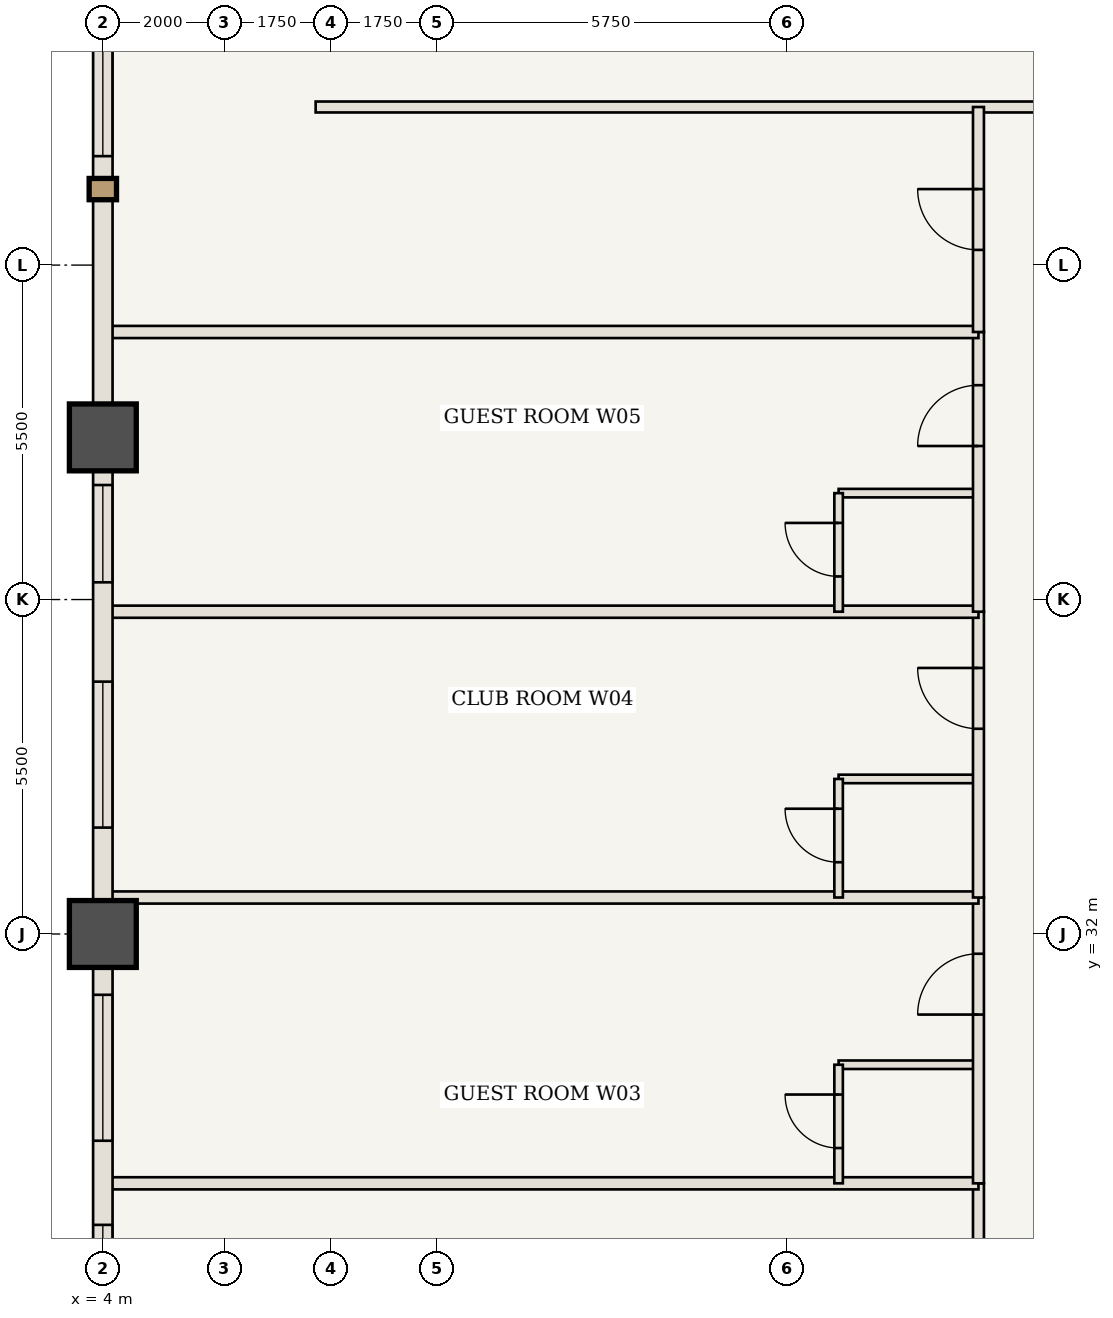
"""IFC4 building model, lengths in metres.
Left out: names, types, materials, properties, quantities, classifications, styles, units other than length and angle.
Written with IfcOpenShell. Run it as: python <this file> out.ifc"""

import sys

from ifc_helpers import new_model, si_unit, direction, frame, frame_2d, origin, origin_2d, place, context, subcontext, project, spatial, rectangle, extrude, element, fill, save


model = new_model("IFC4")
c1 = context("Model", 3, precision=1e-05, world=origin(), true_north=direction((0.0, 1.0)))
c2 = subcontext(c1, "Body", "Model", "MODEL_VIEW")
j1 = project(units=[si_unit("LENGTHUNIT", "METRE"), si_unit("PLANEANGLEUNIT", "RADIAN")], contexts=[c1])
p1 = place(None, origin())
s1 = spatial("IfcSite", under=j1, at=p1, CompositionType="ELEMENT")
p2 = place(p1, origin())
s2 = spatial("IfcBuilding", under=s1, at=p2, CompositionType="ELEMENT")
p3 = place(p2, frame((0.0, 0.0, 42.35)))
s3 = spatial("IfcBuildingStorey", under=s2, at=p3, CompositionType="ELEMENT", Elevation=42.35)
for number, where, z_axis, x_axis in (
    (1, (4.0, 32.0, 0.0), (0.0, 0.0, 1.0), (1.0, 0.0, 0.0)),
    (2, (4.0, 40.167, 0.0), (0.0, 0.0, 1.0), (1.0, 0.0, 0.0)),
):
    element("IfcColumn", number, at=place(p3, frame(where, z_axis=z_axis, x_axis=x_axis)), inside=s3, PredefinedType="COLUMN", context=c2, shape_type="SweptSolid", body=[
        extrude(rectangle(XDim=1.1, YDim=1.1, at=origin_2d()), origin(), (0.0, 0.0, 1.0), 3.5),
    ])
p4 = place(p3, frame((7.5, 45.6, 0.0), z_axis=(0.0, 0.0, 1.0), x_axis=(1.0, 0.0, 0.0)))
e3 = element("IfcWall", 3, at=p4, inside=s3, PredefinedType="STANDARD", context=c2, shape_type="SweptSolid", body=[
    extrude(rectangle(XDim=16.6, YDim=0.18, at=frame_2d((8.3, 0.0))), origin(), (0.0, 0.0, 1.0), 3.32),
])
p5 = place(p4, frame((11.825, 0.0, 0.0)))
e4 = element("IfcOpeningElement", 4, at=p5, cuts=e3, PredefinedType="OPENING", context=c2, shape_type="SweptSolid", body=[
    extrude(rectangle(XDim=1.0, YDim=2.15, at=frame_2d((0.5, 1.075))), frame((0.0, 0.1, 0.0), z_axis=(0.0, -1.0, 0.0), x_axis=(1.0, 0.0, 0.0)), (0.0, 0.0, 1.0), 0.2),
])
p6 = place(p3, frame((18.4, 23.2, 0.0), z_axis=(0.0, 0.0, 1.0), x_axis=(0.0, 1.0, 0.0)))
e5 = element("IfcWall", 5, at=p6, inside=s3, PredefinedType="STANDARD", context=c2, shape_type="SweptSolid", body=[
    extrude(rectangle(XDim=4.7, YDim=0.18, at=frame_2d((2.35, 0.0))), origin(), (0.0, 0.0, 1.0), 3.32),
])
p7 = place(p6, frame((2.775, 0.0, 0.0)))
e6 = element("IfcOpeningElement", 6, at=p7, cuts=e5, PredefinedType="OPENING", context=c2, shape_type="SweptSolid", body=[
    extrude(rectangle(XDim=1.0, YDim=2.15, at=frame_2d((0.5, 1.075))), frame((0.0, 0.1, 0.0), z_axis=(0.0, -1.0, 0.0), x_axis=(1.0, 0.0, 0.0)), (0.0, 0.0, 1.0), 0.2),
])
p8 = place(p3, frame((4.06, 27.9, 0.0), z_axis=(0.0, 0.0, 1.0), x_axis=(1.0, 0.0, 0.0)))
e7 = element("IfcWall", 7, at=p8, inside=s3, PredefinedType="STANDARD", context=c2, shape_type="SweptSolid", body=[
    extrude(rectangle(XDim=14.34, YDim=0.2, at=frame_2d((7.17, 0.0))), origin(), (0.0, 0.0, 1.0), 3.32),
])
p9 = place(p3, frame((16.1, 29.85, 0.0), z_axis=(0.0, 0.0, 1.0), x_axis=(1.0, 0.0, 0.0)))
e8 = element("IfcWall", 8, at=p9, inside=s3, PredefinedType="STANDARD", context=c2, shape_type="SweptSolid", body=[
    extrude(rectangle(XDim=2.3, YDim=0.14, at=frame_2d((1.15, 0.0))), origin(), (0.0, 0.0, 1.0), 3.32),
])
p10 = place(p3, frame((16.1, 27.9, 0.0), z_axis=(0.0, 0.0, 1.0), x_axis=(0.0, 1.0, 0.0)))
e9 = element("IfcWall", 9, at=p10, inside=s3, PredefinedType="STANDARD", context=c2, shape_type="SweptSolid", body=[
    extrude(rectangle(XDim=1.95, YDim=0.14, at=frame_2d((0.975, 0.0))), origin(), (0.0, 0.0, 1.0), 3.32),
])
p11 = place(p10, frame((0.58, 0.0, 0.0)))
e10 = element("IfcOpeningElement", 10, at=p11, cuts=e9, PredefinedType="OPENING", context=c2, shape_type="SweptSolid", body=[
    extrude(rectangle(XDim=0.88, YDim=2.1, at=frame_2d((0.44, 1.05))), frame((0.0, 0.08, 0.0), z_axis=(0.0, -1.0, 0.0), x_axis=(1.0, 0.0, 0.0)), (0.0, 0.0, 1.0), 0.16),
])
p12 = place(p3, frame((18.4, 27.9, 0.0), z_axis=(0.0, 0.0, 1.0), x_axis=(0.0, 1.0, 0.0)))
e11 = element("IfcWall", 11, at=p12, inside=s3, PredefinedType="STANDARD", context=c2, shape_type="SweptSolid", body=[
    extrude(rectangle(XDim=4.7, YDim=0.18, at=frame_2d((2.35, 0.0))), origin(), (0.0, 0.0, 1.0), 3.32),
])
p13 = place(p12, frame((2.775, 0.0, 0.0)))
e12 = element("IfcOpeningElement", 12, at=p13, cuts=e11, PredefinedType="OPENING", context=c2, shape_type="SweptSolid", body=[
    extrude(rectangle(XDim=1.0, YDim=2.15, at=frame_2d((0.5, 1.075))), frame((0.0, 0.1, 0.0), z_axis=(0.0, -1.0, 0.0), x_axis=(1.0, 0.0, 0.0)), (0.0, 0.0, 1.0), 0.2),
])
p14 = place(p3, frame((4.06, 32.6, 0.0), z_axis=(0.0, 0.0, 1.0), x_axis=(1.0, 0.0, 0.0)))
e13 = element("IfcWall", 13, at=p14, inside=s3, PredefinedType="STANDARD", context=c2, shape_type="SweptSolid", body=[
    extrude(rectangle(XDim=14.34, YDim=0.2, at=frame_2d((7.17, 0.0))), origin(), (0.0, 0.0, 1.0), 3.32),
])
p15 = place(p3, frame((16.1, 34.55, 0.0), z_axis=(0.0, 0.0, 1.0), x_axis=(1.0, 0.0, 0.0)))
e14 = element("IfcWall", 14, at=p15, inside=s3, PredefinedType="STANDARD", context=c2, shape_type="SweptSolid", body=[
    extrude(rectangle(XDim=2.3, YDim=0.14, at=frame_2d((1.15, 0.0))), origin(), (0.0, 0.0, 1.0), 3.32),
])
p16 = place(p3, frame((16.1, 32.6, 0.0), z_axis=(0.0, 0.0, 1.0), x_axis=(0.0, 1.0, 0.0)))
e15 = element("IfcWall", 15, at=p16, inside=s3, PredefinedType="STANDARD", context=c2, shape_type="SweptSolid", body=[
    extrude(rectangle(XDim=1.95, YDim=0.14, at=frame_2d((0.975, 0.0))), origin(), (0.0, 0.0, 1.0), 3.32),
])
p17 = place(p16, frame((0.58, 0.0, 0.0)))
e16 = element("IfcOpeningElement", 16, at=p17, cuts=e15, PredefinedType="OPENING", context=c2, shape_type="SweptSolid", body=[
    extrude(rectangle(XDim=0.88, YDim=2.1, at=frame_2d((0.44, 1.05))), frame((0.0, 0.08, 0.0), z_axis=(0.0, -1.0, 0.0), x_axis=(1.0, 0.0, 0.0)), (0.0, 0.0, 1.0), 0.16),
])
p18 = place(p3, frame((18.4, 32.6, 0.0), z_axis=(0.0, 0.0, 1.0), x_axis=(0.0, 1.0, 0.0)))
e17 = element("IfcWall", 17, at=p18, inside=s3, PredefinedType="STANDARD", context=c2, shape_type="SweptSolid", body=[
    extrude(rectangle(XDim=4.7, YDim=0.18, at=frame_2d((2.35, 0.0))), origin(), (0.0, 0.0, 1.0), 3.32),
])
p19 = place(p18, frame((2.775, 0.0, 0.0)))
e18 = element("IfcOpeningElement", 18, at=p19, cuts=e17, PredefinedType="OPENING", context=c2, shape_type="SweptSolid", body=[
    extrude(rectangle(XDim=1.0, YDim=2.15, at=frame_2d((0.5, 1.075))), frame((0.0, 0.1, 0.0), z_axis=(0.0, -1.0, 0.0), x_axis=(1.0, 0.0, 0.0)), (0.0, 0.0, 1.0), 0.2),
])
p20 = place(p3, frame((4.06, 37.3, 0.0), z_axis=(0.0, 0.0, 1.0), x_axis=(1.0, 0.0, 0.0)))
e19 = element("IfcWall", 19, at=p20, inside=s3, PredefinedType="STANDARD", context=c2, shape_type="SweptSolid", body=[
    extrude(rectangle(XDim=14.34, YDim=0.2, at=frame_2d((7.17, 0.0))), origin(), (0.0, 0.0, 1.0), 3.32),
])
p21 = place(p3, frame((16.1, 39.25, 0.0), z_axis=(0.0, 0.0, 1.0), x_axis=(1.0, 0.0, 0.0)))
e20 = element("IfcWall", 20, at=p21, inside=s3, PredefinedType="STANDARD", context=c2, shape_type="SweptSolid", body=[
    extrude(rectangle(XDim=2.3, YDim=0.14, at=frame_2d((1.15, 0.0))), origin(), (0.0, 0.0, 1.0), 3.32),
])
p22 = place(p3, frame((16.1, 37.3, 0.0), z_axis=(0.0, 0.0, 1.0), x_axis=(0.0, 1.0, 0.0)))
e21 = element("IfcWall", 21, at=p22, inside=s3, PredefinedType="STANDARD", context=c2, shape_type="SweptSolid", body=[
    extrude(rectangle(XDim=1.95, YDim=0.14, at=frame_2d((0.975, 0.0))), origin(), (0.0, 0.0, 1.0), 3.32),
])
p23 = place(p22, frame((0.58, 0.0, 0.0)))
e22 = element("IfcOpeningElement", 22, at=p23, cuts=e21, PredefinedType="OPENING", context=c2, shape_type="SweptSolid", body=[
    extrude(rectangle(XDim=0.88, YDim=2.1, at=frame_2d((0.44, 1.05))), frame((0.0, 0.08, 0.0), z_axis=(0.0, -1.0, 0.0), x_axis=(1.0, 0.0, 0.0)), (0.0, 0.0, 1.0), 0.16),
])
p24 = place(p3, frame((18.4, 37.3, 0.0), z_axis=(0.0, 0.0, 1.0), x_axis=(0.0, 1.0, 0.0)))
e23 = element("IfcWall", 23, at=p24, inside=s3, PredefinedType="STANDARD", context=c2, shape_type="SweptSolid", body=[
    extrude(rectangle(XDim=4.6, YDim=0.18, at=frame_2d((2.3, 0.0))), origin(), (0.0, 0.0, 1.0), 3.32),
])
p25 = place(p24, frame((2.725, 0.0, 0.0)))
e24 = element("IfcOpeningElement", 24, at=p25, cuts=e23, PredefinedType="OPENING", context=c2, shape_type="SweptSolid", body=[
    extrude(rectangle(XDim=1.0, YDim=2.15, at=frame_2d((0.5, 1.075))), frame((0.0, 0.1, 0.0), z_axis=(0.0, -1.0, 0.0), x_axis=(1.0, 0.0, 0.0)), (0.0, 0.0, 1.0), 0.2),
])
p26 = place(p3, frame((4.06, 41.9, 0.0), z_axis=(0.0, 0.0, 1.0), x_axis=(1.0, 0.0, 0.0)))
e25 = element("IfcWall", 25, at=p26, inside=s3, PredefinedType="STANDARD", context=c2, shape_type="SweptSolid", body=[
    extrude(rectangle(XDim=14.34, YDim=0.2, at=frame_2d((7.17, 0.0))), origin(), (0.0, 0.0, 1.0), 3.32),
])
p27 = place(p3, frame((18.4, 41.9, 0.0), z_axis=(0.0, 0.0, 1.0), x_axis=(0.0, 1.0, 0.0)))
e26 = element("IfcWall", 26, at=p27, inside=s3, PredefinedType="STANDARD", context=c2, shape_type="SweptSolid", body=[
    extrude(rectangle(XDim=3.7, YDim=0.18, at=frame_2d((1.85, 0.0))), origin(), (0.0, 0.0, 1.0), 3.32),
])
p28 = place(p27, frame((1.35, 0.0, 0.0)))
e27 = element("IfcOpeningElement", 27, at=p28, cuts=e26, PredefinedType="OPENING", context=c2, shape_type="SweptSolid", body=[
    extrude(rectangle(XDim=1.0, YDim=2.15, at=frame_2d((0.5, 1.075))), frame((0.0, 0.1, 0.0), z_axis=(0.0, -1.0, 0.0), x_axis=(1.0, 0.0, 0.0)), (0.0, 0.0, 1.0), 0.2),
])
p29 = place(p3, frame((4.0, 23.833, 0.0), z_axis=(0.0, 0.0, 1.0), x_axis=(0.0, 1.0, 0.0)))
e28 = element("IfcWall", 28, at=p29, inside=s3, PredefinedType="USERDEFINED", context=c2, shape_type="SweptSolid", body=[
    extrude(rectangle(XDim=8.167, YDim=0.32, at=frame_2d((4.083, 0.0))), origin(), (0.0, 0.0, 1.0), 2.52),
])
p30 = place(p29, frame((0.983, 0.0, 0.85)))
e29 = element("IfcOpeningElement", 29, at=p30, cuts=e28, PredefinedType="OPENING", context=c2, shape_type="SweptSolid", body=[
    extrude(rectangle(XDim=2.4, YDim=1.47, at=frame_2d((1.2, 0.735))), frame((0.0, 0.17, 0.0), z_axis=(0.0, -1.0, 0.0), x_axis=(1.0, 0.0, 0.0)), (0.0, 0.0, 1.0), 0.34),
])
p31 = place(p29, frame((4.767, 0.0, 0.85)))
e30 = element("IfcOpeningElement", 30, at=p31, cuts=e28, PredefinedType="OPENING", context=c2, shape_type="SweptSolid", body=[
    extrude(rectangle(XDim=2.4, YDim=1.47, at=frame_2d((1.2, 0.735))), frame((0.0, 0.17, 0.0), z_axis=(0.0, -1.0, 0.0), x_axis=(1.0, 0.0, 0.0)), (0.0, 0.0, 1.0), 0.34),
])
p32 = place(p3, frame((4.0, 32.0, 0.0), z_axis=(0.0, 0.0, 1.0), x_axis=(0.0, 1.0, 0.0)))
e31 = element("IfcWall", 31, at=p32, inside=s3, PredefinedType="USERDEFINED", context=c2, shape_type="SweptSolid", body=[
    extrude(rectangle(XDim=8.167, YDim=0.32, at=frame_2d((4.083, 0.0))), origin(), (0.0, 0.0, 1.0), 2.52),
])
p33 = place(p32, frame((1.75, 0.0, 0.85)))
e32 = element("IfcOpeningElement", 32, at=p33, cuts=e31, PredefinedType="OPENING", context=c2, shape_type="SweptSolid", body=[
    extrude(rectangle(XDim=2.4, YDim=1.47, at=frame_2d((1.2, 0.735))), frame((0.0, 0.17, 0.0), z_axis=(0.0, -1.0, 0.0), x_axis=(1.0, 0.0, 0.0)), (0.0, 0.0, 1.0), 0.34),
])
p34 = place(p32, frame((5.783, 0.0, 0.85)))
e33 = element("IfcOpeningElement", 33, at=p34, cuts=e31, PredefinedType="OPENING", context=c2, shape_type="SweptSolid", body=[
    extrude(rectangle(XDim=1.6, YDim=1.47, at=frame_2d((0.8, 0.735))), frame((0.0, 0.17, 0.0), z_axis=(0.0, -1.0, 0.0), x_axis=(1.0, 0.0, 0.0)), (0.0, 0.0, 1.0), 0.34),
])
p35 = place(p3, frame((4.0, 40.167, 0.0), z_axis=(0.0, 0.0, 1.0), x_axis=(0.0, 1.0, 0.0)))
e34 = element("IfcWall", 34, at=p35, inside=s3, PredefinedType="USERDEFINED", context=c2, shape_type="SweptSolid", body=[
    extrude(rectangle(XDim=8.167, YDim=0.32, at=frame_2d((4.083, 0.0))), origin(), (0.0, 0.0, 1.0), 2.52),
])
p36 = place(p35, frame((4.625, 0.0, 0.85)))
e35 = element("IfcOpeningElement", 35, at=p36, cuts=e34, PredefinedType="OPENING", context=c2, shape_type="SweptSolid", body=[
    extrude(rectangle(XDim=2.8, YDim=1.47, at=frame_2d((1.4, 0.735))), frame((0.0, 0.17, 0.0), z_axis=(0.0, -1.0, 0.0), x_axis=(1.0, 0.0, 0.0)), (0.0, 0.0, 1.0), 0.34),
])
p37 = place(p11, origin())
e36 = element("IfcDoor", 36, at=p37, inside=s3, OperationType="SINGLE_SWING_RIGHT", PredefinedType="DOOR", context=c2, shape_type="SweptSolid", body=[
    extrude(rectangle(XDim=0.88, YDim=2.1, at=frame_2d((0.44, 1.05))), frame((0.0, 0.025, 0.0), z_axis=(0.0, -1.0, 0.0), x_axis=(1.0, 0.0, 0.0)), (0.0, 0.0, 1.0), 0.05),
])
fill(e10, e36)
p38 = place(p13, origin())
e37 = element("IfcDoor", 37, at=p38, inside=s3, OperationType="SINGLE_SWING_LEFT", PredefinedType="DOOR", context=c2, shape_type="SweptSolid", body=[
    extrude(rectangle(XDim=1.0, YDim=2.15, at=frame_2d((0.5, 1.075))), frame((0.0, 0.025, 0.0), z_axis=(0.0, -1.0, 0.0), x_axis=(1.0, 0.0, 0.0)), (0.0, 0.0, 1.0), 0.05),
])
fill(e12, e37)
p39 = place(p17, origin())
e38 = element("IfcDoor", 38, at=p39, inside=s3, OperationType="SINGLE_SWING_RIGHT", PredefinedType="DOOR", context=c2, shape_type="SweptSolid", body=[
    extrude(rectangle(XDim=0.88, YDim=2.1, at=frame_2d((0.44, 1.05))), frame((0.0, 0.025, 0.0), z_axis=(0.0, -1.0, 0.0), x_axis=(1.0, 0.0, 0.0)), (0.0, 0.0, 1.0), 0.05),
])
fill(e16, e38)
p40 = place(p19, origin())
e39 = element("IfcDoor", 39, at=p40, inside=s3, OperationType="SINGLE_SWING_RIGHT", PredefinedType="DOOR", context=c2, shape_type="SweptSolid", body=[
    extrude(rectangle(XDim=1.0, YDim=2.15, at=frame_2d((0.5, 1.075))), frame((0.0, 0.025, 0.0), z_axis=(0.0, -1.0, 0.0), x_axis=(1.0, 0.0, 0.0)), (0.0, 0.0, 1.0), 0.05),
])
fill(e18, e39)
p41 = place(p23, origin())
e40 = element("IfcDoor", 40, at=p41, inside=s3, OperationType="SINGLE_SWING_RIGHT", PredefinedType="DOOR", context=c2, shape_type="SweptSolid", body=[
    extrude(rectangle(XDim=0.88, YDim=2.1, at=frame_2d((0.44, 1.05))), frame((0.0, 0.025, 0.0), z_axis=(0.0, -1.0, 0.0), x_axis=(1.0, 0.0, 0.0)), (0.0, 0.0, 1.0), 0.05),
])
fill(e22, e40)
p42 = place(p25, origin())
e41 = element("IfcDoor", 41, at=p42, inside=s3, OperationType="SINGLE_SWING_LEFT", PredefinedType="DOOR", context=c2, shape_type="SweptSolid", body=[
    extrude(rectangle(XDim=1.0, YDim=2.15, at=frame_2d((0.5, 1.075))), frame((0.0, 0.025, 0.0), z_axis=(0.0, -1.0, 0.0), x_axis=(1.0, 0.0, 0.0)), (0.0, 0.0, 1.0), 0.05),
])
fill(e24, e41)
p43 = place(p28, origin())
e42 = element("IfcDoor", 42, at=p43, inside=s3, OperationType="SINGLE_SWING_RIGHT", PredefinedType="DOOR", context=c2, shape_type="SweptSolid", body=[
    extrude(rectangle(XDim=1.0, YDim=2.15, at=frame_2d((0.5, 1.075))), frame((0.0, 0.025, 0.0), z_axis=(0.0, -1.0, 0.0), x_axis=(1.0, 0.0, 0.0)), (0.0, 0.0, 1.0), 0.05),
])
fill(e27, e42)
p44 = place(p30, origin())
e43 = element("IfcWindow", 43, at=p44, inside=s3, PartitioningType="SINGLE_PANEL", PredefinedType="WINDOW", context=c2, shape_type="SweptSolid", body=[
    extrude(rectangle(XDim=2.4, YDim=1.47, at=frame_2d((1.2, 0.735))), frame((0.0, 0.03, 0.0), z_axis=(0.0, -1.0, 0.0), x_axis=(1.0, 0.0, 0.0)), (0.0, 0.0, 1.0), 0.06),
])
fill(e29, e43)
p45 = place(p31, origin())
e44 = element("IfcWindow", 44, at=p45, inside=s3, PartitioningType="SINGLE_PANEL", PredefinedType="WINDOW", context=c2, shape_type="SweptSolid", body=[
    extrude(rectangle(XDim=2.4, YDim=1.47, at=frame_2d((1.2, 0.735))), frame((0.0, 0.03, 0.0), z_axis=(0.0, -1.0, 0.0), x_axis=(1.0, 0.0, 0.0)), (0.0, 0.0, 1.0), 0.06),
])
fill(e30, e44)
p46 = place(p33, origin())
e45 = element("IfcWindow", 45, at=p46, inside=s3, PartitioningType="SINGLE_PANEL", PredefinedType="WINDOW", context=c2, shape_type="SweptSolid", body=[
    extrude(rectangle(XDim=2.4, YDim=1.47, at=frame_2d((1.2, 0.735))), frame((0.0, 0.03, 0.0), z_axis=(0.0, -1.0, 0.0), x_axis=(1.0, 0.0, 0.0)), (0.0, 0.0, 1.0), 0.06),
])
fill(e32, e45)
p47 = place(p34, origin())
e46 = element("IfcWindow", 46, at=p47, inside=s3, PartitioningType="SINGLE_PANEL", PredefinedType="WINDOW", context=c2, shape_type="SweptSolid", body=[
    extrude(rectangle(XDim=1.6, YDim=1.47, at=frame_2d((0.8, 0.735))), frame((0.0, 0.03, 0.0), z_axis=(0.0, -1.0, 0.0), x_axis=(1.0, 0.0, 0.0)), (0.0, 0.0, 1.0), 0.06),
])
fill(e33, e46)
p48 = place(p36, origin())
e47 = element("IfcWindow", 47, at=p48, inside=s3, PartitioningType="SINGLE_PANEL", PredefinedType="WINDOW", context=c2, shape_type="SweptSolid", body=[
    extrude(rectangle(XDim=2.8, YDim=1.47, at=frame_2d((1.4, 0.735))), frame((0.0, 0.03, 0.0), z_axis=(0.0, -1.0, 0.0), x_axis=(1.0, 0.0, 0.0)), (0.0, 0.0, 1.0), 0.06),
])
fill(e35, e47)
save(model, sys.argv[1])
